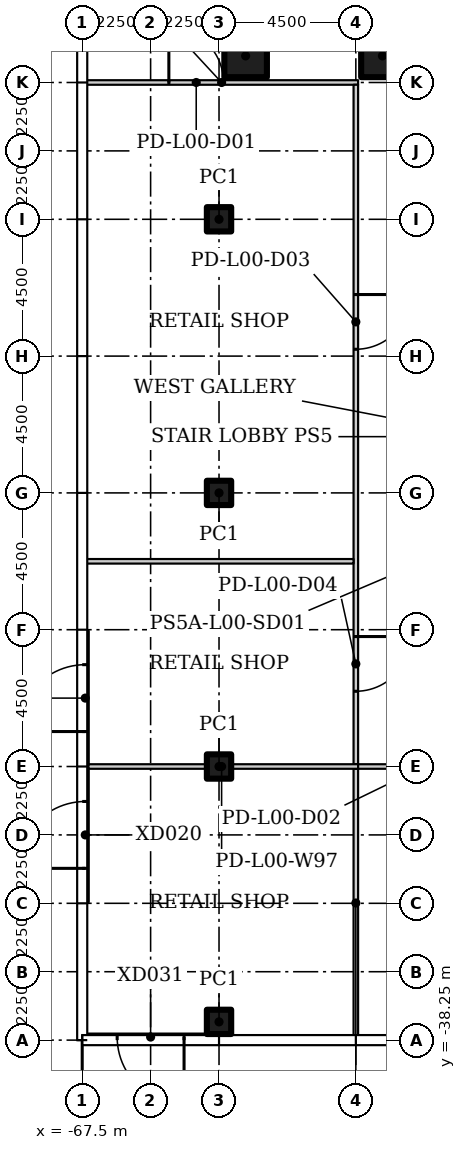
"""IFC4 building model, lengths in metres.
Left out: names, types, materials, properties, quantities, classifications, styles, units other than length and angle.
Written with IfcOpenShell. Run it as: python <this file> out.ifc"""

import sys

from ifc_helpers import new_model, si_unit, direction, frame, frame_2d, origin, origin_2d, place, context, subcontext, project, spatial, rectangle, hollow_rectangle, extrude, element, fill, save


model = new_model("IFC4")
c1 = context("Model", 3, precision=1e-05, world=origin(), true_north=direction((0.0, 1.0)))
c2 = subcontext(c1, "Body", "Model", "MODEL_VIEW")
j1 = project(units=[si_unit("LENGTHUNIT", "METRE"), si_unit("PLANEANGLEUNIT", "RADIAN")], contexts=[c1])
p1 = place(None, origin())
s1 = spatial("IfcSite", under=j1, at=p1, CompositionType="ELEMENT")
p2 = place(p1, origin())
s2 = spatial("IfcBuilding", under=s1, at=p2, CompositionType="ELEMENT")
p3 = place(p2, origin())
s3 = spatial("IfcBuildingStorey", under=s2, at=p3, CompositionType="ELEMENT", Elevation=0.0)
for number, where in (
    (1, (-57.625, -5.875, 0.0)),
    (2, (-62.125, -5.875, 0.0)),
):
    element("IfcColumn", number, at=place(p3, frame(where)), inside=s3, PredefinedType="COLUMN", context=c2, shape_type="SweptSolid", body=[
        extrude(hollow_rectangle(XDim=1.4, YDim=1.4, WallThickness=0.06, at=origin_2d()), origin(), (0.0, 0.0, 1.0), 6.1),
    ])
for number, where in (
    (3, (-63.0, -37.65, 0.0)),
    (4, (-63.0, -29.25, 0.0)),
    (5, (-63.0, -20.25, 0.0)),
    (6, (-63.0, -11.25, 0.0)),
):
    element("IfcColumn", number, at=place(p3, frame(where)), inside=s3, PredefinedType="COLUMN", context=c2, shape_type="SweptSolid", body=[
        extrude(hollow_rectangle(XDim=0.8, YDim=0.8, WallThickness=0.03, at=origin_2d()), origin(), (0.0, 0.0, 1.0), 6.1),
    ])
p4 = place(p3, frame((-67.405, -6.75, 0.0)))
e7 = element("IfcWall", 7, at=p4, inside=s3, PredefinedType="PARTITIONING", context=c2, shape_type="SweptSolid", body=[
    extrude(rectangle(XDim=8.98, YDim=0.15, at=frame_2d((4.49, 0.0))), origin(), (0.0, 0.0, 1.0), 6.1),
])
p5 = place(p4, frame((2.755, 0.0, 0.0)))
e8 = element("IfcOpeningElement", 8, at=p5, cuts=e7, PredefinedType="OPENING", context=c2, shape_type="SweptSolid", body=[
    extrude(rectangle(XDim=1.8, YDim=2.4, at=frame_2d((0.9, 1.2))), frame((0.0, 0.085, 0.0), z_axis=(0.0, -1.0, 0.0), x_axis=(1.0, 0.0, 0.0)), (0.0, 0.0, 1.0), 0.17),
])
p6 = place(p3, frame((-58.5, -6.825, 0.0), z_axis=(0.0, 0.0, 1.0), x_axis=(0.0, -1.0, 0.0)))
e9 = element("IfcWall", 9, at=p6, inside=s3, PredefinedType="PARTITIONING", context=c2, shape_type="SweptSolid", body=[
    extrude(rectangle(XDim=22.35, YDim=0.15, at=frame_2d((11.175, 0.0))), origin(), (0.0, 0.0, 1.0), 6.1),
])
p7 = place(p6, frame((6.9, 0.0, 0.0)))
e10 = element("IfcOpeningElement", 10, at=p7, cuts=e9, PredefinedType="OPENING", context=c2, shape_type="SweptSolid", body=[
    extrude(rectangle(XDim=1.8, YDim=2.4, at=frame_2d((0.9, 1.2))), frame((0.0, 0.085, 0.0), z_axis=(0.0, -1.0, 0.0), x_axis=(1.0, 0.0, 0.0)), (0.0, 0.0, 1.0), 0.17),
])
p8 = place(p6, frame((18.15, 0.0, 0.0)))
e11 = element("IfcOpeningElement", 11, at=p8, cuts=e9, PredefinedType="OPENING", context=c2, shape_type="SweptSolid", body=[
    extrude(rectangle(XDim=1.8, YDim=2.4, at=frame_2d((0.9, 1.2))), frame((0.0, 0.085, 0.0), z_axis=(0.0, -1.0, 0.0), x_axis=(1.0, 0.0, 0.0)), (0.0, 0.0, 1.0), 0.17),
])
p9 = place(p3, frame((-58.5, -38.155, 0.0), z_axis=(0.0, 0.0, 1.0), x_axis=(0.0, 1.0, 0.0)))
e12 = element("IfcWall", 12, at=p9, inside=s3, PredefinedType="PARTITIONING", context=c2, shape_type="SweptSolid", body=[
    extrude(rectangle(XDim=8.83, YDim=0.15, at=frame_2d((4.415, 0.0))), origin(), (0.0, 0.0, 1.0), 6.1),
])
p10 = place(p3, frame((-58.575, -29.25, 0.0)))
e13 = element("IfcWall", 13, at=p10, inside=s3, PredefinedType="PARTITIONING", context=c2, shape_type="SweptSolid", body=[
    extrude(rectangle(XDim=4.65, YDim=0.15, at=frame_2d((2.325, 0.0))), origin(), (0.0, 0.0, 1.0), 6.1),
])
p11 = place(p10, frame((1.425, 0.0, 0.0)))
e14 = element("IfcOpeningElement", 14, at=p11, cuts=e13, PredefinedType="OPENING", context=c2, shape_type="SweptSolid", body=[
    extrude(rectangle(XDim=1.8, YDim=2.4, at=frame_2d((0.9, 1.2))), frame((0.0, 0.085, 0.0), z_axis=(0.0, -1.0, 0.0), x_axis=(1.0, 0.0, 0.0)), (0.0, 0.0, 1.0), 0.17),
])
p12 = place(p3, frame((-58.425, -29.25, 0.0), z_axis=(0.0, 0.0, 1.0), x_axis=(-1.0, 0.0, 0.0)))
e15 = element("IfcWall", 15, at=p12, inside=s3, PredefinedType="PARTITIONING", context=c2, shape_type="SweptSolid", body=[
    extrude(rectangle(XDim=8.98, YDim=0.15, at=frame_2d((4.49, 0.0))), origin(), (0.0, 0.0, 1.0), 6.1),
])
p13 = place(p3, frame((-58.575, -22.5, 0.0), z_axis=(0.0, 0.0, 1.0), x_axis=(-1.0, 0.0, 0.0)))
e16 = element("IfcWall", 16, at=p13, inside=s3, PredefinedType="PARTITIONING", context=c2, shape_type="SweptSolid", body=[
    extrude(rectangle(XDim=8.83, YDim=0.15, at=frame_2d((4.415, 0.0))), origin(), (0.0, 0.0, 1.0), 6.1),
])
p14 = place(p3, frame((-67.4, -33.71, 0.0), z_axis=(0.0, 0.0, 1.0), x_axis=(0.0, 1.0, 0.0)))
e17 = element("IfcWall", 17, at=p14, inside=s3, PredefinedType="SOLIDWALL", context=c2, shape_type="SweptSolid", body=[
    extrude(rectangle(XDim=4.427, YDim=0.2, at=frame_2d((2.213, 0.0))), origin(), (0.0, 0.0, 1.0), 3.0),
])
p15 = place(p14, frame((1.11, 0.0, 0.0)))
e18 = element("IfcOpeningElement", 18, at=p15, cuts=e17, PredefinedType="OPENING", context=c2, shape_type="SweptSolid", body=[
    extrude(rectangle(XDim=2.2, YDim=2.4, at=frame_2d((1.1, 1.2))), frame((0.0, 0.11, 0.0), z_axis=(0.0, -1.0, 0.0), x_axis=(1.0, 0.0, 0.0)), (0.0, 0.0, 1.0), 0.22),
])
p16 = place(p3, frame((-67.4, -29.217, 0.0), z_axis=(0.0, 0.0, 1.0), x_axis=(0.0, 1.0, 0.0)))
e19 = element("IfcWall", 19, at=p16, inside=s3, PredefinedType="SOLIDWALL", context=c2, shape_type="SweptSolid", body=[
    extrude(rectangle(XDim=4.427, YDim=0.2, at=frame_2d((2.213, 0.0))), origin(), (0.0, 0.0, 1.0), 3.0),
])
p17 = place(p16, frame((1.117, 0.0, 0.0)))
e20 = element("IfcOpeningElement", 20, at=p17, cuts=e19, PredefinedType="OPENING", context=c2, shape_type="SweptSolid", body=[
    extrude(rectangle(XDim=2.2, YDim=2.4, at=frame_2d((1.1, 1.2))), frame((0.0, 0.11, 0.0), z_axis=(0.0, -1.0, 0.0), x_axis=(1.0, 0.0, 0.0)), (0.0, 0.0, 1.0), 0.22),
])
p18 = place(p3, frame((-63.04, -38.15, 0.0), z_axis=(0.0, 0.0, 1.0), x_axis=(-1.0, 0.0, 0.0)))
e21 = element("IfcWall", 21, at=p18, inside=s3, PredefinedType="SOLIDWALL", context=c2, shape_type="SweptSolid", body=[
    extrude(rectangle(XDim=4.42, YDim=0.2, at=frame_2d((2.21, 0.0))), origin(), (0.0, 0.0, 1.0), 3.0),
])
p19 = place(p18, frame((1.11, 0.0, 0.0)))
e22 = element("IfcOpeningElement", 22, at=p19, cuts=e21, PredefinedType="OPENING", context=c2, shape_type="SweptSolid", body=[
    extrude(rectangle(XDim=2.2, YDim=2.4, at=frame_2d((1.1, 1.2))), frame((0.0, 0.11, 0.0), z_axis=(0.0, -1.0, 0.0), x_axis=(1.0, 0.0, 0.0)), (0.0, 0.0, 1.0), 0.22),
])
p20 = place(p5, origin())
e23 = element("IfcDoor", 23, at=p20, inside=s3, OperationType="DOUBLE_DOOR_SINGLE_SWING", PredefinedType="DOOR", context=c2, shape_type="SweptSolid", body=[
    extrude(rectangle(XDim=1.8, YDim=2.4, at=frame_2d((0.9, 1.2))), frame((0.0, 0.025, 0.0), z_axis=(0.0, -1.0, 0.0), x_axis=(1.0, 0.0, 0.0)), (0.0, 0.0, 1.0), 0.05),
])
fill(e8, e23)
p21 = place(p7, origin())
e24 = element("IfcDoor", 24, at=p21, inside=s3, OperationType="DOUBLE_DOOR_SINGLE_SWING", PredefinedType="DOOR", context=c2, shape_type="SweptSolid", body=[
    extrude(rectangle(XDim=1.8, YDim=2.4, at=frame_2d((0.9, 1.2))), frame((0.0, 0.025, 0.0), z_axis=(0.0, -1.0, 0.0), x_axis=(1.0, 0.0, 0.0)), (0.0, 0.0, 1.0), 0.05),
])
fill(e10, e24)
p22 = place(p8, origin())
e25 = element("IfcDoor", 25, at=p22, inside=s3, OperationType="DOUBLE_DOOR_SINGLE_SWING", PredefinedType="DOOR", context=c2, shape_type="SweptSolid", body=[
    extrude(rectangle(XDim=1.8, YDim=2.4, at=frame_2d((0.9, 1.2))), frame((0.0, 0.025, 0.0), z_axis=(0.0, -1.0, 0.0), x_axis=(1.0, 0.0, 0.0)), (0.0, 0.0, 1.0), 0.05),
])
fill(e11, e25)
p23 = place(p15, origin())
e26 = element("IfcDoor", 26, at=p23, inside=s3, OperationType="DOUBLE_DOOR_SINGLE_SWING", PredefinedType="DOOR", context=c2, shape_type="SweptSolid", body=[
    extrude(rectangle(XDim=2.2, YDim=2.4, at=frame_2d((1.1, 1.2))), frame((0.0, 0.025, 0.0), z_axis=(0.0, -1.0, 0.0), x_axis=(1.0, 0.0, 0.0)), (0.0, 0.0, 1.0), 0.05),
])
fill(e18, e26)
p24 = place(p17, origin())
e27 = element("IfcDoor", 27, at=p24, inside=s3, OperationType="DOUBLE_DOOR_SINGLE_SWING", PredefinedType="DOOR", context=c2, shape_type="SweptSolid", body=[
    extrude(rectangle(XDim=2.2, YDim=2.4, at=frame_2d((1.1, 1.2))), frame((0.0, 0.025, 0.0), z_axis=(0.0, -1.0, 0.0), x_axis=(1.0, 0.0, 0.0)), (0.0, 0.0, 1.0), 0.05),
])
fill(e20, e27)
p25 = place(p19, origin())
e28 = element("IfcDoor", 28, at=p25, inside=s3, OperationType="DOUBLE_DOOR_SINGLE_SWING", PredefinedType="DOOR", context=c2, shape_type="SweptSolid", body=[
    extrude(rectangle(XDim=2.2, YDim=2.4, at=frame_2d((1.1, 1.2))), frame((0.0, 0.025, 0.0), z_axis=(0.0, -1.0, 0.0), x_axis=(1.0, 0.0, 0.0)), (0.0, 0.0, 1.0), 0.05),
])
fill(e22, e28)
save(model, sys.argv[1])
